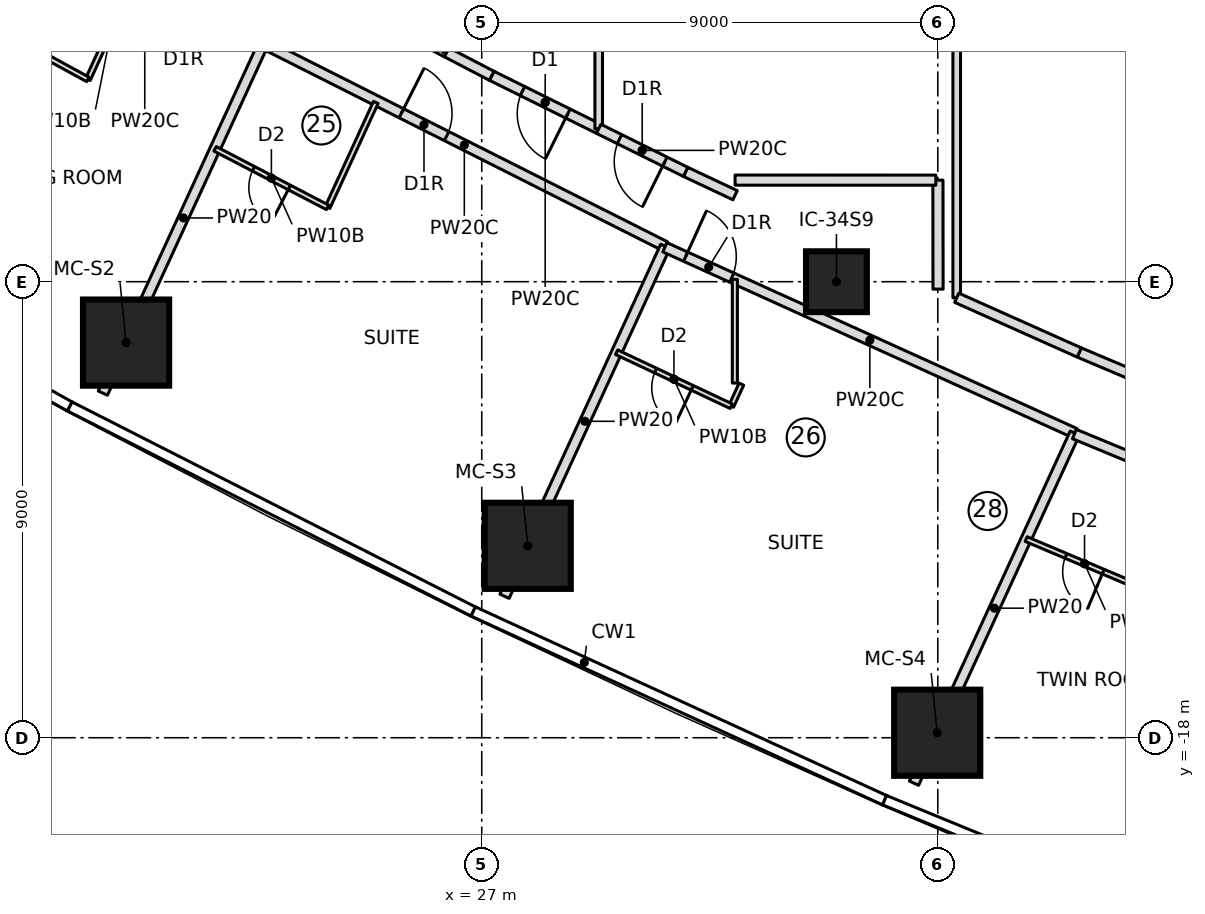
"""IFC4 building model, lengths in metres.
Left out: names, types, materials, properties, quantities, classifications, styles, units other than length and angle.
Written with IfcOpenShell. Run it as: python <this file> out.ifc"""

import sys

from ifc_helpers import new_model, si_unit, direction, frame, frame_2d, origin, origin_2d, place, context, subcontext, project, spatial, rectangle, extrude, element, fill, save


model = new_model("IFC4")
c1 = context("Model", 3, precision=1e-05, world=origin(), true_north=direction((0.0, 1.0)))
c2 = subcontext(c1, "Body", "Model", "MODEL_VIEW")
j1 = project(units=[si_unit("LENGTHUNIT", "METRE"), si_unit("PLANEANGLEUNIT", "RADIAN")], contexts=[c1])
p1 = place(None, origin())
s1 = spatial("IfcSite", under=j1, at=p1, CompositionType="ELEMENT")
p2 = place(p1, origin())
s2 = spatial("IfcBuilding", under=s1, at=p2, CompositionType="ELEMENT")
p3 = place(p2, frame((0.0, 0.0, 113.3)))
s3 = spatial("IfcBuildingStorey", under=s2, at=p3, CompositionType="ELEMENT", Elevation=113.3)
for number, where, z_axis, x_axis in (
    (1, (19.981, -10.202, 0.0), (0.0, 0.0, 1.0), (1.0, 0.0, 0.0)),
    (2, (27.907, -14.212, 0.0), (0.0, 0.0, 1.0), (1.0, 0.0, 0.0)),
    (3, (35.988, -17.902, 0.0), (0.0, 0.0, 1.0), (1.0, 0.0, 0.0)),
):
    element("IfcColumn", number, at=place(p3, frame(where, z_axis=z_axis, x_axis=x_axis)), inside=s3, PredefinedType="COLUMN", context=c2, shape_type="SweptSolid", body=[
        extrude(rectangle(XDim=1.7, YDim=1.7, at=origin_2d()), origin(), (0.0, 0.0, 1.0), 3.55),
    ])
p4 = place(p3, frame((34.0, -9.0, 0.0), z_axis=(0.0, 0.0, 1.0), x_axis=(1.0, 0.0, 0.0)))
e4 = element("IfcColumn", 4, at=p4, inside=s3, PredefinedType="COLUMN", context=c2, shape_type="SweptSolid", body=[
    extrude(rectangle(XDim=1.2, YDim=1.2, at=origin_2d()), origin(), (0.0, 0.0, 1.0), 3.55),
])
p5 = place(p3, frame((20.18, -2.934, 0.0), z_axis=(0.0, 0.0, 1.0), x_axis=(-0.417450047292, -0.908699872354, 0.0)))
e5 = element("IfcWall", 5, at=p5, inside=s3, PredefinedType="PARTITIONING", context=c2, shape_type="SweptSolid", body=[
    extrude(rectangle(XDim=2.283, YDim=0.1, at=frame_2d((1.141, 0.0))), origin(), (0.0, 0.0, 1.0), 3.25),
])
p6 = place(p5, frame((0.75, 0.0, 0.0)))
e6 = element("IfcOpeningElement", 6, at=p6, cuts=e5, PredefinedType="OPENING", context=c2, shape_type="SweptSolid", body=[
    extrude(rectangle(XDim=0.8, YDim=2.1, at=frame_2d((0.4, 1.05))), frame((0.0, 0.06, 0.0), z_axis=(0.0, -1.0, 0.0), x_axis=(1.0, 0.0, 0.0)), (0.0, 0.0, 1.0), 0.12),
])
p7 = place(p3, frame((19.228, -5.008, 0.0), z_axis=(0.0, 0.0, 1.0), x_axis=(-0.877424481957, 0.479714788663, 0.0)))
e7 = element("IfcWall", 7, at=p7, inside=s3, PredefinedType="PARTITIONING", context=c2, shape_type="SweptSolid", body=[
    extrude(rectangle(XDim=1.625, YDim=0.1, at=frame_2d((0.813, 0.0))), origin(), (0.0, 0.0, 1.0), 3.25),
])
p8 = place(p3, frame((19.522, -11.199, 0.0), z_axis=(0.0, 0.0, 1.0), x_axis=(0.417413534969, 0.908716644959, 0.0)))
e8 = element("IfcWall", 8, at=p8, inside=s3, PredefinedType="PARTITIONING", context=c2, shape_type="SweptSolid", body=[
    extrude(rectangle(XDim=7.609, YDim=0.2, at=frame_2d((3.805, 0.0))), origin(), (0.0, 0.0, 1.0), 3.25),
])
p9 = place(p3, frame((22.69, -4.302, 0.0), z_axis=(0.0, 0.0, 1.0), x_axis=(0.892904919467, -0.450245271815, 0.0)))
e9 = element("IfcWall", 9, at=p9, inside=s3, PredefinedType="PARTITIONING", context=c2, shape_type="SweptSolid", body=[
    extrude(rectangle(XDim=8.883, YDim=0.2, at=frame_2d((4.441, 0.0))), origin(), (0.0, 0.0, 1.0), 3.25),
])
p10 = place(p9, frame((3.05, 0.0, 0.0)))
e10 = element("IfcOpeningElement", 10, at=p10, cuts=e9, PredefinedType="OPENING", context=c2, shape_type="SweptSolid", body=[
    extrude(rectangle(XDim=1.0, YDim=2.1, at=frame_2d((0.5, 1.05))), frame((0.0, 0.11, 0.0), z_axis=(0.0, -1.0, 0.0), x_axis=(1.0, 0.0, 0.0)), (0.0, 0.0, 1.0), 0.22),
])
p11 = place(p3, frame((24.909, -5.462, 0.0), z_axis=(0.0, 0.0, 1.0), x_axis=(-0.417454762401, -0.908697706253, 0.0)))
e11 = element("IfcWall", 11, at=p11, inside=s3, PredefinedType="PARTITIONING", context=c2, shape_type="SweptSolid", body=[
    extrude(rectangle(XDim=2.28, YDim=0.1, at=frame_2d((1.14, 0.0))), origin(), (0.0, 0.0, 1.0), 3.25),
])
p12 = place(p3, frame((23.958, -7.533, 0.0), z_axis=(0.0, 0.0, 1.0), x_axis=(-0.886911586599, 0.461939214135, 0.0)))
e12 = element("IfcWall", 12, at=p12, inside=s3, PredefinedType="PARTITIONING", context=c2, shape_type="SweptSolid", body=[
    extrude(rectangle(XDim=2.503, YDim=0.1, at=frame_2d((1.251, 0.0))), origin(), (0.0, 0.0, 1.0), 3.25),
])
p13 = place(p12, frame((0.85, 0.0, 0.0)))
e13 = element("IfcOpeningElement", 13, at=p13, cuts=e12, PredefinedType="OPENING", context=c2, shape_type="SweptSolid", body=[
    extrude(rectangle(XDim=0.8, YDim=2.1, at=frame_2d((0.4, 1.05))), frame((0.0, 0.06, 0.0), z_axis=(0.0, -1.0, 0.0), x_axis=(1.0, 0.0, 0.0)), (0.0, 0.0, 1.0), 0.12),
])
p14 = place(p3, frame((27.449, -15.208, 0.0), z_axis=(0.0, 0.0, 1.0), x_axis=(0.417429919618, 0.90870911859, 0.0)))
e14 = element("IfcWall", 14, at=p14, inside=s3, PredefinedType="PARTITIONING", context=c2, shape_type="SweptSolid", body=[
    extrude(rectangle(XDim=7.6, YDim=0.2, at=frame_2d((3.8, 0.0))), origin(), (0.0, 0.0, 1.0), 3.25),
])
p15 = place(p3, frame((30.614, -8.32, 0.0), z_axis=(0.0, 0.0, 1.0), x_axis=(0.910751030363, -0.41295588226, 0.0)))
e15 = element("IfcWall", 15, at=p15, inside=s3, PredefinedType="PARTITIONING", context=c2, shape_type="SweptSolid", body=[
    extrude(rectangle(XDim=8.883, YDim=0.2, at=frame_2d((4.442, 0.0))), origin(), (0.0, 0.0, 1.0), 3.25),
])
p16 = place(p15, frame((0.45, 0.0, 0.0)))
e16 = element("IfcOpeningElement", 16, at=p16, cuts=e15, PredefinedType="OPENING", context=c2, shape_type="SweptSolid", body=[
    extrude(rectangle(XDim=1.0, YDim=2.1, at=frame_2d((0.5, 1.05))), frame((0.0, 0.11, 0.0), z_axis=(0.0, -1.0, 0.0), x_axis=(1.0, 0.0, 0.0)), (0.0, 0.0, 1.0), 0.22),
])
p17 = place(p3, frame((32.124, -11.022, 0.0), z_axis=(0.0, 0.0, 1.0), x_axis=(-0.4176025781, -0.908629785316, 0.0)))
e17 = element("IfcWall", 17, at=p17, inside=s3, PredefinedType="PARTITIONING", context=c2, shape_type="SweptSolid", body=[
    extrude(rectangle(XDim=0.479, YDim=0.1, at=frame_2d((0.239, 0.0))), origin(), (0.0, 0.0, 1.0), 3.25),
])
p18 = place(p3, frame((31.924, -11.457, 0.0), z_axis=(0.0, 0.0, 1.0), x_axis=(-0.904688082375, 0.426074493027, 0.0)))
e18 = element("IfcWall", 18, at=p18, inside=s3, PredefinedType="PARTITIONING", context=c2, shape_type="SweptSolid", body=[
    extrude(rectangle(XDim=2.5, YDim=0.1, at=frame_2d((1.25, 0.0))), origin(), (0.0, 0.0, 1.0), 3.25),
])
p19 = place(p18, frame((0.85, 0.0, 0.0)))
e19 = element("IfcOpeningElement", 19, at=p19, cuts=e18, PredefinedType="OPENING", context=c2, shape_type="SweptSolid", body=[
    extrude(rectangle(XDim=0.8, YDim=2.1, at=frame_2d((0.4, 1.05))), frame((0.0, 0.06, 0.0), z_axis=(0.0, -1.0, 0.0), x_axis=(1.0, 0.0, 0.0)), (0.0, 0.0, 1.0), 0.12),
])
p20 = place(p3, frame((35.531, -18.898, 0.0), z_axis=(0.0, 0.0, 1.0), x_axis=(0.417416334044, 0.908715359215, 0.0)))
e20 = element("IfcWall", 20, at=p20, inside=s3, PredefinedType="PARTITIONING", context=c2, shape_type="SweptSolid", body=[
    extrude(rectangle(XDim=7.604, YDim=0.2, at=frame_2d((3.802, 0.0))), origin(), (0.0, 0.0, 1.0), 3.25),
])
p21 = place(p3, frame((38.696, -12.007, 0.0), z_axis=(0.0, 0.0, 1.0), x_axis=(0.923970612896, -0.382463470811, 0.0)))
e21 = element("IfcWall", 21, at=p21, inside=s3, PredefinedType="PARTITIONING", context=c2, shape_type="SweptSolid", body=[
    extrude(rectangle(XDim=4.441, YDim=0.2, at=frame_2d((2.22, 0.0))), origin(), (0.0, 0.0, 1.0), 3.25),
])
p22 = place(p21, frame((3.05, 0.0, 0.0)))
e22 = element("IfcOpeningElement", 22, at=p22, cuts=e21, PredefinedType="OPENING", context=c2, shape_type="SweptSolid", body=[
    extrude(rectangle(XDim=1.0, YDim=2.1, at=frame_2d((0.5, 1.05))), frame((0.0, 0.11, 0.0), z_axis=(0.0, -1.0, 0.0), x_axis=(1.0, 0.0, 0.0)), (0.0, 0.0, 1.0), 0.22),
])
p23 = place(p3, frame((40.048, -15.054, 0.0), z_axis=(0.0, 0.0, 1.0), x_axis=(-0.921042675983, 0.38946166566, 0.0)))
e23 = element("IfcWall", 23, at=p23, inside=s3, PredefinedType="PARTITIONING", context=c2, shape_type="SweptSolid", body=[
    extrude(rectangle(XDim=2.501, YDim=0.1, at=frame_2d((1.25, 0.0))), origin(), (0.0, 0.0, 1.0), 3.25),
])
p24 = place(p23, frame((0.85, 0.0, 0.0)))
e24 = element("IfcOpeningElement", 24, at=p24, cuts=e23, PredefinedType="OPENING", context=c2, shape_type="SweptSolid", body=[
    extrude(rectangle(XDim=0.8, YDim=2.1, at=frame_2d((0.4, 1.05))), frame((0.0, 0.06, 0.0), z_axis=(0.0, -1.0, 0.0), x_axis=(1.0, 0.0, 0.0)), (0.0, 0.0, 1.0), 0.12),
])
p25 = place(p3, frame((39.623, -20.62, 0.0), z_axis=(0.0, 0.0, 1.0), x_axis=(0.417427858403, 0.908710065438, 0.0)))
e25 = element("IfcWall", 25, at=p25, inside=s3, PredefinedType="PARTITIONING", context=c2, shape_type="SweptSolid", body=[
    extrude(rectangle(XDim=7.61, YDim=0.2, at=frame_2d((3.805, 0.0))), origin(), (0.0, 0.0, 1.0), 3.25),
])
p26 = place(p3, frame((26.308, -4.473, 0.0), z_axis=(0.0, 0.0, 1.0), x_axis=(-0.886901344009, 0.461958879116, 0.0)))
e26 = element("IfcWall", 26, at=p26, inside=s3, PredefinedType="PARTITIONING", context=c2, shape_type="SweptSolid", body=[
    extrude(rectangle(XDim=3.271, YDim=0.2, at=frame_2d((1.636, 0.0))), origin(), (0.0, 0.0, 1.0), 3.25),
])
p27 = place(p3, frame((26.308, -4.473, 0.0), z_axis=(0.0, 0.0, 1.0), x_axis=(0.0, 1.0, 0.0)))
e27 = element("IfcWall", 27, at=p27, inside=s3, PredefinedType="PARTITIONING", context=c2, shape_type="SweptSolid", body=[
    extrude(rectangle(XDim=8.946, YDim=0.15, at=frame_2d((4.473, 0.0))), origin(), (0.0, 0.0, 1.0), 3.25),
])
p28 = place(p3, frame((29.308, -5.983, 0.0), z_axis=(0.0, 0.0, 1.0), x_axis=(-0.895954899574, 0.444145041546, 0.0)))
e28 = element("IfcWall", 28, at=p28, inside=s3, PredefinedType="PARTITIONING", context=c2, shape_type="SweptSolid", body=[
    extrude(rectangle(XDim=2.357, YDim=0.2, at=frame_2d((1.179, 0.0))), origin(), (0.0, 0.0, 1.0), 3.25),
])
p29 = place(p28, frame((0.678, 0.0, 0.0)))
e29 = element("IfcOpeningElement", 29, at=p29, cuts=e28, PredefinedType="OPENING", context=c2, shape_type="SweptSolid", body=[
    extrude(rectangle(XDim=1.0, YDim=2.1, at=frame_2d((0.5, 1.05))), frame((0.0, 0.11, 0.0), z_axis=(0.0, -1.0, 0.0), x_axis=(1.0, 0.0, 0.0)), (0.0, 0.0, 1.0), 0.22),
])
p30 = place(p3, frame((27.196, -4.936, 0.0), z_axis=(0.0, 0.0, 1.0), x_axis=(-0.886893275317, 0.461974369633, 0.0)))
e30 = element("IfcWall", 30, at=p30, inside=s3, PredefinedType="PARTITIONING", context=c2, shape_type="SweptSolid", body=[
    extrude(rectangle(XDim=1.001, YDim=0.2, at=frame_2d((0.501, 0.0))), origin(), (0.0, 0.0, 1.0), 3.25),
])
p31 = place(p3, frame((29.308, -5.983, 0.0), z_axis=(0.0, 0.0, 1.0), x_axis=(0.0, 1.0, 0.0)))
e31 = element("IfcWall", 31, at=p31, inside=s3, PredefinedType="PARTITIONING", context=c2, shape_type="SweptSolid", body=[
    extrude(rectangle(XDim=11.965, YDim=0.15, at=frame_2d((5.983, 0.0))), origin(), (0.0, 0.0, 1.0), 3.25),
])
p32 = place(p3, frame((31.025, -6.833, 0.0), z_axis=(0.0, 0.0, 1.0), x_axis=(-0.896001589052, 0.444050844404, 0.0)))
e32 = element("IfcWall", 32, at=p32, inside=s3, PredefinedType="PARTITIONING", context=c2, shape_type="SweptSolid", body=[
    extrude(rectangle(XDim=1.916, YDim=0.2, at=frame_2d((0.958, 0.0))), origin(), (0.0, 0.0, 1.0), 3.25),
])
p33 = place(p32, frame((0.458, 0.0, 0.0)))
e33 = element("IfcOpeningElement", 33, at=p33, cuts=e32, PredefinedType="OPENING", context=c2, shape_type="SweptSolid", body=[
    extrude(rectangle(XDim=1.0, YDim=2.1, at=frame_2d((0.5, 1.05))), frame((0.0, 0.11, 0.0), z_axis=(0.0, -1.0, 0.0), x_axis=(1.0, 0.0, 0.0)), (0.0, 0.0, 1.0), 0.22),
])
p34 = place(p3, frame((32.0, -7.293, 0.0), z_axis=(0.0, 0.0, 1.0), x_axis=(-0.904690325494, 0.426069730159, 0.0)))
e34 = element("IfcWall", 34, at=p34, inside=s3, PredefinedType="PARTITIONING", context=c2, shape_type="SweptSolid", body=[
    extrude(rectangle(XDim=1.078, YDim=0.2, at=frame_2d((0.539, 0.0))), origin(), (0.0, 0.0, 1.0), 3.25),
])
p35 = place(p3, frame((36.374, -9.317, 0.0), z_axis=(0.0, 0.0, 1.0), x_axis=(0.0, 1.0, 0.0)))
e35 = element("IfcWall", 35, at=p35, inside=s3, PredefinedType="PARTITIONING", context=c2, shape_type="SweptSolid", body=[
    extrude(rectangle(XDim=18.634, YDim=0.15, at=frame_2d((9.317, 0.0))), origin(), (0.0, 0.0, 1.0), 3.25),
])
p36 = place(p3, frame((42.728, -12.062, 0.0), z_axis=(0.0, 0.0, 1.0), x_axis=(-0.921037415532, 0.389474105929, 0.0)))
e36 = element("IfcWall", 36, at=p36, inside=s3, PredefinedType="PARTITIONING", context=c2, shape_type="SweptSolid", body=[
    extrude(rectangle(XDim=4.273, YDim=0.2, at=frame_2d((2.137, 0.0))), origin(), (0.0, 0.0, 1.0), 3.25),
])
p37 = place(p3, frame((38.792, -10.397, 0.0), z_axis=(0.0, 0.0, 1.0), x_axis=(-0.913030623494, 0.407891015544, 0.0)))
e37 = element("IfcWall", 37, at=p37, inside=s3, PredefinedType="PARTITIONING", context=c2, shape_type="SweptSolid", body=[
    extrude(rectangle(XDim=2.648, YDim=0.2, at=frame_2d((1.324, 0.0))), origin(), (0.0, 0.0, 1.0), 3.25),
])
p38 = place(p3, frame((31.995, -8.954, 0.0), z_axis=(0.0, 0.0, 1.0), x_axis=(0.0, -1.0, 0.0)))
e38 = element("IfcWall", 38, at=p38, inside=s3, PredefinedType="PARTITIONING", context=c2, shape_type="SweptSolid", body=[
    extrude(rectangle(XDim=2.046, YDim=0.1, at=frame_2d((1.023, 0.0))), origin(), (0.0, 0.0, 1.0), 3.25),
])
p39 = place(p3, frame((36.005, -9.146, 0.0), z_axis=(0.0, 0.0, 1.0), x_axis=(-0.001135073049, 0.999999355804, 0.0)))
e39 = element("IfcWall", 39, at=p39, inside=s3, PredefinedType="PARTITIONING", context=c2, shape_type="SweptSolid", body=[
    extrude(rectangle(XDim=2.151, YDim=0.2, at=frame_2d((1.075, 0.0))), origin(), (0.0, 0.0, 1.0), 3.25),
])
p40 = place(p3, frame((35.962, -6.996, 0.0), z_axis=(0.0, 0.0, 1.0), x_axis=(-0.999999992409, 0.000123213405, 0.0)))
e40 = element("IfcWall", 40, at=p40, inside=s3, PredefinedType="PARTITIONING", context=c2, shape_type="SweptSolid", body=[
    extrude(rectangle(XDim=3.963, YDim=0.2, at=frame_2d((1.981, 0.0))), origin(), (0.0, 0.0, 1.0), 3.25),
])
p41 = place(p13, origin())
e41 = element("IfcDoor", 41, at=p41, inside=s3, OperationType="SINGLE_SWING_LEFT", PredefinedType="DOOR", context=c2, shape_type="SweptSolid", body=[
    extrude(rectangle(XDim=0.8, YDim=2.1, at=frame_2d((0.4, 1.05))), frame((0.0, 0.025, 0.0), z_axis=(0.0, -1.0, 0.0), x_axis=(1.0, 0.0, 0.0)), (0.0, 0.0, 1.0), 0.05),
])
fill(e13, e41)
p42 = place(p10, origin())
e42 = element("IfcDoor", 42, at=p42, inside=s3, OperationType="SINGLE_SWING_RIGHT", PredefinedType="DOOR", context=c2, shape_type="SweptSolid", body=[
    extrude(rectangle(XDim=1.0, YDim=2.1, at=frame_2d((0.5, 1.05))), frame((0.0, 0.025, 0.0), z_axis=(0.0, -1.0, 0.0), x_axis=(1.0, 0.0, 0.0)), (0.0, 0.0, 1.0), 0.05),
])
fill(e10, e42)
p43 = place(p19, origin())
e43 = element("IfcDoor", 43, at=p43, inside=s3, OperationType="SINGLE_SWING_LEFT", PredefinedType="DOOR", context=c2, shape_type="SweptSolid", body=[
    extrude(rectangle(XDim=0.8, YDim=2.1, at=frame_2d((0.4, 1.05))), frame((0.0, 0.025, 0.0), z_axis=(0.0, -1.0, 0.0), x_axis=(1.0, 0.0, 0.0)), (0.0, 0.0, 1.0), 0.05),
])
fill(e19, e43)
p44 = place(p16, origin())
e44 = element("IfcDoor", 44, at=p44, inside=s3, OperationType="SINGLE_SWING_RIGHT", PredefinedType="DOOR", context=c2, shape_type="SweptSolid", body=[
    extrude(rectangle(XDim=1.0, YDim=2.1, at=frame_2d((0.5, 1.05))), frame((0.0, 0.025, 0.0), z_axis=(0.0, -1.0, 0.0), x_axis=(1.0, 0.0, 0.0)), (0.0, 0.0, 1.0), 0.05),
])
fill(e16, e44)
p45 = place(p24, origin())
e45 = element("IfcDoor", 45, at=p45, inside=s3, OperationType="SINGLE_SWING_LEFT", PredefinedType="DOOR", context=c2, shape_type="SweptSolid", body=[
    extrude(rectangle(XDim=0.8, YDim=2.1, at=frame_2d((0.4, 1.05))), frame((0.0, 0.025, 0.0), z_axis=(0.0, -1.0, 0.0), x_axis=(1.0, 0.0, 0.0)), (0.0, 0.0, 1.0), 0.05),
])
fill(e24, e45)
p46 = place(p29, origin())
e46 = element("IfcDoor", 46, at=p46, inside=s3, OperationType="SINGLE_SWING_LEFT", PredefinedType="DOOR", context=c2, shape_type="SweptSolid", body=[
    extrude(rectangle(XDim=1.0, YDim=2.1, at=frame_2d((0.5, 1.05))), frame((0.0, 0.025, 0.0), z_axis=(0.0, -1.0, 0.0), x_axis=(1.0, 0.0, 0.0)), (0.0, 0.0, 1.0), 0.05),
])
fill(e29, e46)
p47 = place(p33, origin())
e47 = element("IfcDoor", 47, at=p47, inside=s3, OperationType="SINGLE_SWING_RIGHT", PredefinedType="DOOR", context=c2, shape_type="SweptSolid", body=[
    extrude(rectangle(XDim=1.0, YDim=2.1, at=frame_2d((0.5, 1.05))), frame((0.0, 0.025, 0.0), z_axis=(0.0, -1.0, 0.0), x_axis=(1.0, 0.0, 0.0)), (0.0, 0.0, 1.0), 0.05),
])
fill(e33, e47)
save(model, sys.argv[1])
